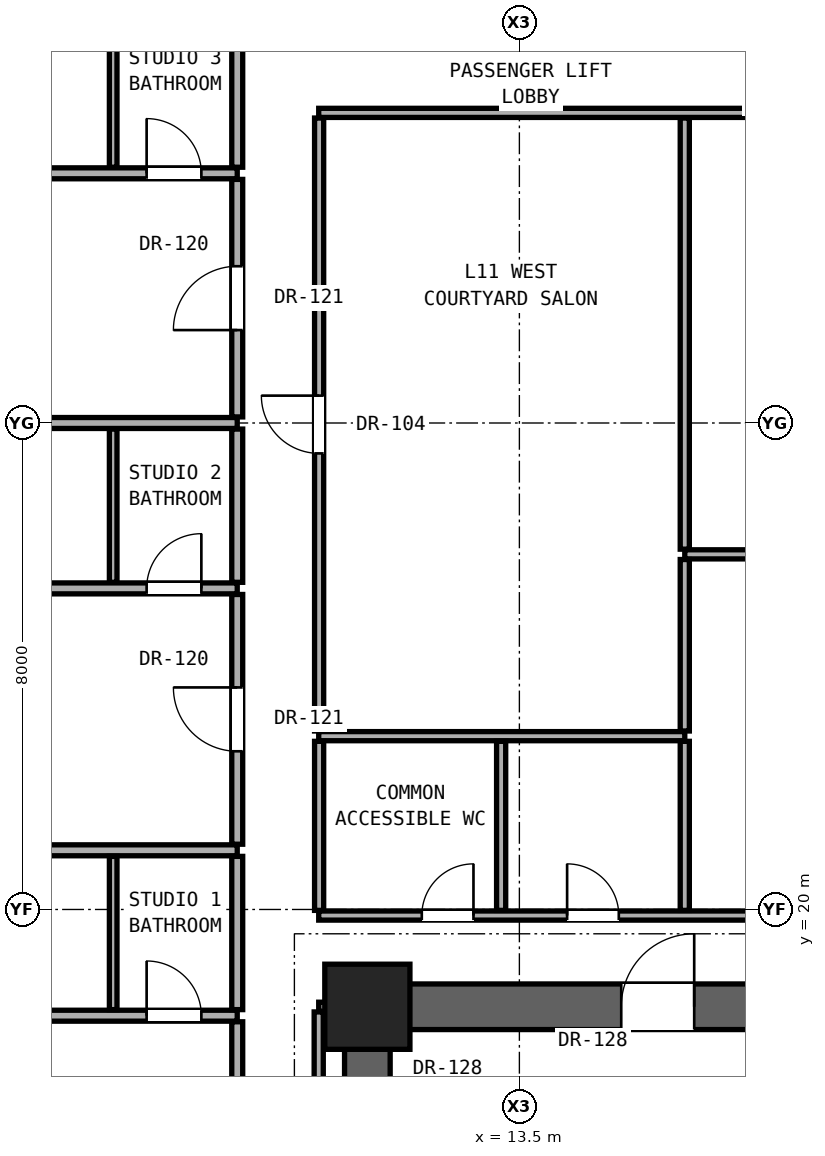
"""IFC4 building model, lengths in metres.
Left out: names, types, materials, properties, quantities, classifications, styles, units other than length and angle.
Written with IfcOpenShell. Run it as: python <this file> out.ifc"""

import sys

from ifc_helpers import new_model, si_unit, direction, frame, frame_2d, origin, origin_2d, place, context, subcontext, project, spatial, rectangle, extrude, element, fill, save


model = new_model("IFC4")
c1 = context("Model", 3, precision=1e-05, world=origin(), true_north=direction((0.0, 1.0)))
c2 = subcontext(c1, "Body", "Model", "MODEL_VIEW")
j1 = project(units=[si_unit("LENGTHUNIT", "METRE"), si_unit("PLANEANGLEUNIT", "RADIAN")], contexts=[c1])
p1 = place(None, origin())
s1 = spatial("IfcSite", under=j1, at=p1, CompositionType="ELEMENT")
p2 = place(p1, origin())
s2 = spatial("IfcBuilding", under=s1, at=p2, CompositionType="ELEMENT")
p3 = place(p2, frame((0.0, 0.0, 42.2)))
s3 = spatial("IfcBuildingStorey", under=s2, at=p3, CompositionType="ELEMENT", Elevation=42.2)
p4 = place(p3, frame((11.0, 18.4, 0.0), z_axis=(0.0, 0.0, 1.0), x_axis=(1.0, 0.0, 0.0)))
e1 = element("IfcColumn", 1, at=p4, inside=s3, PredefinedType="COLUMN", context=c2, shape_type="SweptSolid", body=[
    extrude(rectangle(XDim=1.4, YDim=1.4, at=origin_2d()), origin(), (0.0, 0.0, 1.0), 3.3),
])
p5 = place(p3, frame((11.0, 12.4, 0.0), z_axis=(0.0, 0.0, 1.0), x_axis=(0.0, 1.0, 0.0)))
e2 = element("IfcWall", 2, at=p5, inside=s3, PredefinedType="SHEAR", context=c2, shape_type="SweptSolid", body=[
    extrude(rectangle(XDim=6.0, YDim=0.75, at=frame_2d((3.0, 0.0))), origin(), (0.0, 0.0, 1.0), 3.06),
])
p6 = place(p3, frame((11.0, 18.4, 0.0), z_axis=(0.0, 0.0, 1.0), x_axis=(1.0, 0.0, 0.0)))
e3 = element("IfcWall", 3, at=p6, inside=s3, PredefinedType="SHEAR", context=c2, shape_type="SweptSolid", body=[
    extrude(rectangle(XDim=19.0, YDim=0.75, at=frame_2d((9.5, 0.0))), origin(), (0.0, 0.0, 1.0), 3.06),
])
p7 = place(p6, frame((4.175, 0.0, 0.0)))
e4 = element("IfcOpeningElement", 4, at=p7, cuts=e3, PredefinedType="OPENING", context=c2, shape_type="SweptSolid", body=[
    extrude(rectangle(XDim=1.2, YDim=2.25, at=frame_2d((0.6, 1.125))), frame((0.0, 0.385, 0.0), z_axis=(0.0, -1.0, 0.0), x_axis=(1.0, 0.0, 0.0)), (0.0, 0.0, 1.0), 0.77),
])
p8 = place(p6, frame((9.6, 0.0, 0.0)))
e5 = element("IfcOpeningElement", 5, at=p8, cuts=e3, PredefinedType="OPENING", context=c2, shape_type="SweptSolid", body=[
    extrude(rectangle(XDim=1.3, YDim=2.3, at=frame_2d((0.65, 1.15))), frame((0.0, 0.385, 0.0), z_axis=(0.0, -1.0, 0.0), x_axis=(1.0, 0.0, 0.0)), (0.0, 0.0, 1.0), 0.77),
])
p9 = place(p6, frame((11.9, 0.0, 0.0)))
e6 = element("IfcOpeningElement", 6, at=p9, cuts=e3, PredefinedType="OPENING", context=c2, shape_type="SweptSolid", body=[
    extrude(rectangle(XDim=1.3, YDim=2.3, at=frame_2d((0.65, 1.15))), frame((0.0, 0.385, 0.0), z_axis=(0.0, -1.0, 0.0), x_axis=(1.0, 0.0, 0.0)), (0.0, 0.0, 1.0), 0.77),
])
p10 = place(p6, frame((14.3, 0.0, 0.0)))
e7 = element("IfcOpeningElement", 7, at=p10, cuts=e3, PredefinedType="OPENING", context=c2, shape_type="SweptSolid", body=[
    extrude(rectangle(XDim=1.3, YDim=2.3, at=frame_2d((0.65, 1.15))), frame((0.0, 0.385, 0.0), z_axis=(0.0, -1.0, 0.0), x_axis=(1.0, 0.0, 0.0)), (0.0, 0.0, 1.0), 0.77),
])
p11 = place(p6, frame((16.6, 0.0, 0.0)))
e8 = element("IfcOpeningElement", 8, at=p11, cuts=e3, PredefinedType="OPENING", context=c2, shape_type="SweptSolid", body=[
    extrude(rectangle(XDim=1.3, YDim=2.3, at=frame_2d((0.65, 1.15))), frame((0.0, 0.385, 0.0), z_axis=(0.0, -1.0, 0.0), x_axis=(1.0, 0.0, 0.0)), (0.0, 0.0, 1.0), 0.77),
])
p12 = place(p3, frame((-2.16, 18.253, 0.0), z_axis=(0.0, 0.0, 1.0), x_axis=(1.0, 0.0, 0.0)))
e9 = element("IfcWall", 9, at=p12, inside=s3, PredefinedType="PARTITIONING", context=c2, shape_type="SweptSolid", body=[
    extrude(rectangle(XDim=11.02, YDim=0.18, at=frame_2d((5.51, 0.0))), origin(), (0.0, 0.0, 1.0), 2.436),
])
p13 = place(p12, frame((5.385, 0.0, 0.0)))
e10 = element("IfcOpeningElement", 10, at=p13, cuts=e9, PredefinedType="OPENING", context=c2, shape_type="SweptSolid", body=[
    extrude(rectangle(XDim=0.95, YDim=2.15, at=frame_2d((0.475, 1.075))), frame((0.0, 0.1, 0.0), z_axis=(0.0, -1.0, 0.0), x_axis=(1.0, 0.0, 0.0)), (0.0, 0.0, 1.0), 0.2),
])
p14 = place(p12, frame((9.53, 0.0, 0.0)))
e11 = element("IfcOpeningElement", 11, at=p14, cuts=e9, PredefinedType="OPENING", context=c2, shape_type="SweptSolid", body=[
    extrude(rectangle(XDim=0.9, YDim=2.1, at=frame_2d((0.45, 1.05))), frame((0.0, 0.1, 0.0), z_axis=(0.0, -1.0, 0.0), x_axis=(1.0, 0.0, 0.0)), (0.0, 0.0, 1.0), 0.2),
])
p15 = place(p3, frame((10.2, 18.4, 0.0), z_axis=(0.0, 0.0, 1.0), x_axis=(1.0, 0.0, 0.0)))
e12 = element("IfcWall", 12, at=p15, inside=s3, PredefinedType="PARTITIONING", context=c2, shape_type="SweptSolid", body=[
    extrude(rectangle(XDim=0.43, YDim=0.15, at=frame_2d((0.215, 0.0))), origin(), (0.0, 0.0, 1.0), 2.436),
])
p16 = place(p3, frame((10.2, 19.9, 0.0), z_axis=(0.0, 0.0, 1.0), x_axis=(1.0, 0.0, 0.0)))
e13 = element("IfcWall", 13, at=p16, inside=s3, PredefinedType="PARTITIONING", context=c2, shape_type="SweptSolid", body=[
    extrude(rectangle(XDim=20.6, YDim=0.15, at=frame_2d((10.3, 0.0))), origin(), (0.0, 0.0, 1.0), 2.104),
])
p17 = place(p16, frame((1.695, 0.0, 0.0)))
e14 = element("IfcOpeningElement", 14, at=p17, cuts=e13, PredefinedType="OPENING", context=c2, shape_type="SweptSolid", body=[
    extrude(rectangle(XDim=0.85, YDim=2.01, at=frame_2d((0.425, 1.005))), frame((0.0, 0.085, 0.0), z_axis=(0.0, -1.0, 0.0), x_axis=(1.0, 0.0, 0.0)), (0.0, 0.0, 1.0), 0.17),
])
p18 = place(p16, frame((4.085, 0.0, 0.0)))
e15 = element("IfcOpeningElement", 15, at=p18, cuts=e13, PredefinedType="OPENING", context=c2, shape_type="SweptSolid", body=[
    extrude(rectangle(XDim=0.85, YDim=2.01, at=frame_2d((0.425, 1.005))), frame((0.0, 0.085, 0.0), z_axis=(0.0, -1.0, 0.0), x_axis=(1.0, 0.0, 0.0)), (0.0, 0.0, 1.0), 0.17),
])
p19 = place(p16, frame((9.677, 0.0, 0.0)))
e16 = element("IfcOpeningElement", 16, at=p19, cuts=e13, PredefinedType="OPENING", context=c2, shape_type="SweptSolid", body=[
    extrude(rectangle(XDim=0.85, YDim=2.01, at=frame_2d((0.425, 1.005))), frame((0.0, 0.085, 0.0), z_axis=(0.0, -1.0, 0.0), x_axis=(1.0, 0.0, 0.0)), (0.0, 0.0, 1.0), 0.17),
])
p20 = place(p16, frame((16.948, 0.0, 0.0)))
e17 = element("IfcOpeningElement", 17, at=p20, cuts=e13, PredefinedType="OPENING", context=c2, shape_type="SweptSolid", body=[
    extrude(rectangle(XDim=0.85, YDim=2.01, at=frame_2d((0.425, 1.005))), frame((0.0, 0.085, 0.0), z_axis=(0.0, -1.0, 0.0), x_axis=(1.0, 0.0, 0.0)), (0.0, 0.0, 1.0), 0.17),
])
p21 = place(p3, frame((-2.16, 20.973, 0.0), z_axis=(0.0, 0.0, 1.0), x_axis=(1.0, 0.0, 0.0)))
e18 = element("IfcWall", 18, at=p21, inside=s3, PredefinedType="PARTITIONING", context=c2, shape_type="SweptSolid", body=[
    extrude(rectangle(XDim=11.02, YDim=0.18, at=frame_2d((5.51, 0.0))), origin(), (0.0, 0.0, 1.0), 2.125),
])
p22 = place(p3, frame((10.2, 22.85, 0.0), z_axis=(0.0, 0.0, 1.0), x_axis=(1.0, 0.0, 0.0)))
e19 = element("IfcWall", 19, at=p22, inside=s3, PredefinedType="PARTITIONING", context=c2, shape_type="SweptSolid", body=[
    extrude(rectangle(XDim=6.02, YDim=0.15, at=frame_2d((3.01, 0.0))), origin(), (0.0, 0.0, 1.0), 2.104),
])
p23 = place(p3, frame((-2.16, 25.28, 0.0), z_axis=(0.0, 0.0, 1.0), x_axis=(1.0, 0.0, 0.0)))
e20 = element("IfcWall", 20, at=p23, inside=s3, PredefinedType="PARTITIONING", context=c2, shape_type="SweptSolid", body=[
    extrude(rectangle(XDim=11.02, YDim=0.18, at=frame_2d((5.51, 0.0))), origin(), (0.0, 0.0, 1.0), 2.125),
])
p24 = place(p23, frame((5.035, 0.0, 0.0)))
e21 = element("IfcOpeningElement", 21, at=p24, cuts=e20, PredefinedType="OPENING", context=c2, shape_type="SweptSolid", body=[
    extrude(rectangle(XDim=0.85, YDim=2.01, at=frame_2d((0.425, 1.005))), frame((0.0, 0.1, 0.0), z_axis=(0.0, -1.0, 0.0), x_axis=(1.0, 0.0, 0.0)), (0.0, 0.0, 1.0), 0.2),
])
p25 = place(p23, frame((9.53, 0.0, 0.0)))
e22 = element("IfcOpeningElement", 22, at=p25, cuts=e20, PredefinedType="OPENING", context=c2, shape_type="SweptSolid", body=[
    extrude(rectangle(XDim=0.9, YDim=2.1, at=frame_2d((0.45, 1.05))), frame((0.0, 0.1, 0.0), z_axis=(0.0, -1.0, 0.0), x_axis=(1.0, 0.0, 0.0)), (0.0, 0.0, 1.0), 0.2),
])
p26 = place(p3, frame((16.22, 25.84, 0.0), z_axis=(0.0, 0.0, 1.0), x_axis=(1.0, 0.0, 0.0)))
e23 = element("IfcWall", 23, at=p26, inside=s3, PredefinedType="PARTITIONING", context=c2, shape_type="SweptSolid", body=[
    extrude(rectangle(XDim=14.58, YDim=0.15, at=frame_2d((7.29, 0.0))), origin(), (0.0, 0.0, 1.0), 2.104),
])
p27 = place(p3, frame((-2.16, 28.0, 0.0), z_axis=(0.0, 0.0, 1.0), x_axis=(1.0, 0.0, 0.0)))
e24 = element("IfcWall", 24, at=p27, inside=s3, PredefinedType="PARTITIONING", context=c2, shape_type="SweptSolid", body=[
    extrude(rectangle(XDim=11.02, YDim=0.18, at=frame_2d((5.51, 0.0))), origin(), (0.0, 0.0, 1.0), 2.125),
])
p28 = place(p3, frame((-2.16, 32.106, 0.0), z_axis=(0.0, 0.0, 1.0), x_axis=(1.0, 0.0, 0.0)))
e25 = element("IfcWall", 25, at=p28, inside=s3, PredefinedType="PARTITIONING", context=c2, shape_type="SweptSolid", body=[
    extrude(rectangle(XDim=11.02, YDim=0.18, at=frame_2d((5.51, 0.0))), origin(), (0.0, 0.0, 1.0), 2.125),
])
p29 = place(p28, frame((5.035, 0.0, 0.0)))
e26 = element("IfcOpeningElement", 26, at=p29, cuts=e25, PredefinedType="OPENING", context=c2, shape_type="SweptSolid", body=[
    extrude(rectangle(XDim=0.85, YDim=2.01, at=frame_2d((0.425, 1.005))), frame((0.0, 0.1, 0.0), z_axis=(0.0, -1.0, 0.0), x_axis=(1.0, 0.0, 0.0)), (0.0, 0.0, 1.0), 0.2),
])
p30 = place(p28, frame((9.53, 0.0, 0.0)))
e27 = element("IfcOpeningElement", 27, at=p30, cuts=e25, PredefinedType="OPENING", context=c2, shape_type="SweptSolid", body=[
    extrude(rectangle(XDim=0.9, YDim=2.1, at=frame_2d((0.45, 1.05))), frame((0.0, 0.1, 0.0), z_axis=(0.0, -1.0, 0.0), x_axis=(1.0, 0.0, 0.0)), (0.0, 0.0, 1.0), 0.2),
])
p31 = place(p3, frame((10.2, 33.1, 0.0), z_axis=(0.0, 0.0, 1.0), x_axis=(1.0, 0.0, 0.0)))
e28 = element("IfcWall", 28, at=p31, inside=s3, PredefinedType="PARTITIONING", context=c2, shape_type="SweptSolid", body=[
    extrude(rectangle(XDim=20.6, YDim=0.15, at=frame_2d((10.3, 0.0))), origin(), (0.0, 0.0, 1.0), 2.104),
])
p32 = place(p31, frame((9.677, 0.0, 0.0)))
e29 = element("IfcOpeningElement", 29, at=p32, cuts=e28, PredefinedType="OPENING", context=c2, shape_type="SweptSolid", body=[
    extrude(rectangle(XDim=0.85, YDim=2.01, at=frame_2d((0.425, 1.005))), frame((0.0, 0.085, 0.0), z_axis=(0.0, -1.0, 0.0), x_axis=(1.0, 0.0, 0.0)), (0.0, 0.0, 1.0), 0.17),
])
p33 = place(p31, frame((16.948, 0.0, 0.0)))
e30 = element("IfcOpeningElement", 30, at=p33, cuts=e28, PredefinedType="OPENING", context=c2, shape_type="SweptSolid", body=[
    extrude(rectangle(XDim=0.85, YDim=2.01, at=frame_2d((0.425, 1.005))), frame((0.0, 0.085, 0.0), z_axis=(0.0, -1.0, 0.0), x_axis=(1.0, 0.0, 0.0)), (0.0, 0.0, 1.0), 0.17),
])
p34 = place(p3, frame((6.82, 18.353, 0.0), z_axis=(0.0, 0.0, 1.0), x_axis=(0.0, 1.0, 0.0)))
e31 = element("IfcWall", 31, at=p34, inside=s3, PredefinedType="PARTITIONING", context=c2, shape_type="SweptSolid", body=[
    extrude(rectangle(XDim=2.52, YDim=0.125, at=frame_2d((1.26, 0.0))), origin(), (0.0, 0.0, 1.0), 2.452),
])
p35 = place(p3, frame((6.82, 25.38, 0.0), z_axis=(0.0, 0.0, 1.0), x_axis=(0.0, 1.0, 0.0)))
e32 = element("IfcWall", 32, at=p35, inside=s3, PredefinedType="PARTITIONING", context=c2, shape_type="SweptSolid", body=[
    extrude(rectangle(XDim=2.52, YDim=0.125, at=frame_2d((1.26, 0.0))), origin(), (0.0, 0.0, 1.0), 3.06),
])
p36 = place(p3, frame((6.82, 32.206, 0.0), z_axis=(0.0, 0.0, 1.0), x_axis=(0.0, 1.0, 0.0)))
e33 = element("IfcWall", 33, at=p36, inside=s3, PredefinedType="PARTITIONING", context=c2, shape_type="SweptSolid", body=[
    extrude(rectangle(XDim=2.547, YDim=0.125, at=frame_2d((1.274, 0.0))), origin(), (0.0, 0.0, 1.0), 3.06),
])
p37 = place(p3, frame((8.86, 13.912, 0.0), z_axis=(0.0, 0.0, 1.0), x_axis=(0.0, 1.0, 0.0)))
e34 = element("IfcWall", 34, at=p37, inside=s3, PredefinedType="PARTITIONING", context=c2, shape_type="SweptSolid", body=[
    extrude(rectangle(XDim=4.241, YDim=0.18, at=frame_2d((2.121, 0.0))), origin(), (0.0, 0.0, 1.0), 2.436),
])
p38 = place(p37, frame((0.246, 0.0, 0.0)))
e35 = element("IfcOpeningElement", 35, at=p38, cuts=e34, PredefinedType="OPENING", context=c2, shape_type="SweptSolid", body=[
    extrude(rectangle(XDim=1.05, YDim=2.2, at=frame_2d((0.525, 1.1))), frame((0.0, 0.1, 0.0), z_axis=(0.0, -1.0, 0.0), x_axis=(1.0, 0.0, 0.0)), (0.0, 0.0, 1.0), 0.2),
])
p39 = place(p3, frame((8.86, 18.353, 0.0), z_axis=(0.0, 0.0, 1.0), x_axis=(0.0, 1.0, 0.0)))
e36 = element("IfcWall", 36, at=p39, inside=s3, PredefinedType="PARTITIONING", context=c2, shape_type="SweptSolid", body=[
    extrude(rectangle(XDim=2.52, YDim=0.18, at=frame_2d((1.26, 0.0))), origin(), (0.0, 0.0, 1.0), 2.452),
])
p40 = place(p3, frame((8.86, 21.073, 0.0), z_axis=(0.0, 0.0, 1.0), x_axis=(0.0, 1.0, 0.0)))
e37 = element("IfcWall", 37, at=p40, inside=s3, PredefinedType="PARTITIONING", context=c2, shape_type="SweptSolid", body=[
    extrude(rectangle(XDim=4.107, YDim=0.18, at=frame_2d((2.053, 0.0))), origin(), (0.0, 0.0, 1.0), 2.279),
])
p41 = place(p40, frame((1.529, 0.0, 0.0)))
e38 = element("IfcOpeningElement", 38, at=p41, cuts=e37, PredefinedType="OPENING", context=c2, shape_type="SweptSolid", body=[
    extrude(rectangle(XDim=1.05, YDim=2.2, at=frame_2d((0.525, 1.1))), frame((0.0, 0.1, 0.0), z_axis=(0.0, -1.0, 0.0), x_axis=(1.0, 0.0, 0.0)), (0.0, 0.0, 1.0), 0.2),
])
p42 = place(p3, frame((8.86, 25.38, 0.0), z_axis=(0.0, 0.0, 1.0), x_axis=(0.0, 1.0, 0.0)))
e39 = element("IfcWall", 39, at=p42, inside=s3, PredefinedType="PARTITIONING", context=c2, shape_type="SweptSolid", body=[
    extrude(rectangle(XDim=2.52, YDim=0.18, at=frame_2d((1.26, 0.0))), origin(), (0.0, 0.0, 1.0), 3.06),
])
p43 = place(p3, frame((8.86, 28.1, 0.0), z_axis=(0.0, 0.0, 1.0), x_axis=(0.0, 1.0, 0.0)))
e40 = element("IfcWall", 40, at=p43, inside=s3, PredefinedType="PARTITIONING", context=c2, shape_type="SweptSolid", body=[
    extrude(rectangle(XDim=3.906, YDim=0.18, at=frame_2d((1.953, 0.0))), origin(), (0.0, 0.0, 1.0), 2.279),
])
p44 = place(p43, frame((1.428, 0.0, 0.0)))
e41 = element("IfcOpeningElement", 41, at=p44, cuts=e40, PredefinedType="OPENING", context=c2, shape_type="SweptSolid", body=[
    extrude(rectangle(XDim=1.05, YDim=2.2, at=frame_2d((0.525, 1.1))), frame((0.0, 0.1, 0.0), z_axis=(0.0, -1.0, 0.0), x_axis=(1.0, 0.0, 0.0)), (0.0, 0.0, 1.0), 0.2),
])
p45 = place(p3, frame((8.86, 32.206, 0.0), z_axis=(0.0, 0.0, 1.0), x_axis=(0.0, 1.0, 0.0)))
e42 = element("IfcWall", 42, at=p45, inside=s3, PredefinedType="PARTITIONING", context=c2, shape_type="SweptSolid", body=[
    extrude(rectangle(XDim=2.547, YDim=0.18, at=frame_2d((1.274, 0.0))), origin(), (0.0, 0.0, 1.0), 3.06),
])
p46 = place(p3, frame((10.2, 12.335, 0.0), z_axis=(0.0, 0.0, 1.0), x_axis=(0.0, 1.0, 0.0)))
e43 = element("IfcWall", 43, at=p46, inside=s3, PredefinedType="PARTITIONING", context=c2, shape_type="SweptSolid", body=[
    extrude(rectangle(XDim=5.98, YDim=0.15, at=frame_2d((2.99, 0.0))), origin(), (0.0, 0.0, 1.0), 2.436),
])
p47 = place(p3, frame((10.207, 19.985, 0.0), z_axis=(0.0, 0.0, 1.0), x_axis=(0.0, 1.0, 0.0)))
e44 = element("IfcWall", 44, at=p47, inside=s3, PredefinedType="PARTITIONING", context=c2, shape_type="SweptSolid", body=[
    extrude(rectangle(XDim=2.78, YDim=0.15, at=frame_2d((1.39, 0.0))), origin(), (0.0, 0.0, 1.0), 3.06),
])
p48 = place(p3, frame((10.207, 22.935, 0.0), z_axis=(0.0, 0.0, 1.0), x_axis=(0.0, 1.0, 0.0)))
e45 = element("IfcWall", 45, at=p48, inside=s3, PredefinedType="PARTITIONING", context=c2, shape_type="SweptSolid", body=[
    extrude(rectangle(XDim=10.08, YDim=0.15, at=frame_2d((5.04, 0.0))), origin(), (0.0, 0.0, 1.0), 2.279),
])
p49 = place(p48, frame((4.565, 0.0, 0.0)))
e46 = element("IfcOpeningElement", 46, at=p49, cuts=e45, PredefinedType="OPENING", context=c2, shape_type="SweptSolid", body=[
    extrude(rectangle(XDim=0.95, YDim=2.15, at=frame_2d((0.475, 1.075))), frame((0.0, 0.085, 0.0), z_axis=(0.0, -1.0, 0.0), x_axis=(1.0, 0.0, 0.0)), (0.0, 0.0, 1.0), 0.17),
])
for number, where, z_axis, x_axis in (
    (47, (13.2, 19.985, 0.0), (0.0, 0.0, 1.0), (0.0, 1.0, 0.0)),
    (48, (16.22, 19.985, 0.0), (0.0, 0.0, 1.0), (0.0, 1.0, 0.0)),
):
    element("IfcWall", number, at=place(p3, frame(where, z_axis=z_axis, x_axis=x_axis)), inside=s3, PredefinedType="PARTITIONING", context=c2, shape_type="SweptSolid", body=[
        extrude(rectangle(XDim=2.78, YDim=0.15, at=frame_2d((1.39, 0.0))), origin(), (0.0, 0.0, 1.0), 3.06),
    ])
p50 = place(p3, frame((16.22, 22.935, 0.0), z_axis=(0.0, 0.0, 1.0), x_axis=(0.0, 1.0, 0.0)))
e49 = element("IfcWall", 49, at=p50, inside=s3, PredefinedType="PARTITIONING", context=c2, shape_type="SweptSolid", body=[
    extrude(rectangle(XDim=2.82, YDim=0.15, at=frame_2d((1.41, 0.0))), origin(), (0.0, 0.0, 1.0), 2.104),
])
p51 = place(p3, frame((16.22, 25.925, 0.0), z_axis=(0.0, 0.0, 1.0), x_axis=(0.0, 1.0, 0.0)))
e50 = element("IfcWall", 50, at=p51, inside=s3, PredefinedType="PARTITIONING", context=c2, shape_type="SweptSolid", body=[
    extrude(rectangle(XDim=7.09, YDim=0.15, at=frame_2d((3.545, 0.0))), origin(), (0.0, 0.0, 1.0), 2.104),
])
p52 = place(p7, origin())
e51 = element("IfcDoor", 51, at=p52, inside=s3, OperationType="SINGLE_SWING_RIGHT", PredefinedType="DOOR", context=c2, shape_type="SweptSolid", body=[
    extrude(rectangle(XDim=1.2, YDim=2.25, at=frame_2d((0.6, 1.125))), frame((0.0, 0.025, 0.0), z_axis=(0.0, -1.0, 0.0), x_axis=(1.0, 0.0, 0.0)), (0.0, 0.0, 1.0), 0.05),
])
fill(e4, e51)
p53 = place(p17, origin())
e52 = element("IfcDoor", 52, at=p53, inside=s3, OperationType="SINGLE_SWING_RIGHT", PredefinedType="DOOR", context=c2, shape_type="SweptSolid", body=[
    extrude(rectangle(XDim=0.85, YDim=2.01, at=frame_2d((0.425, 1.005))), frame((0.0, 0.025, 0.0), z_axis=(0.0, -1.0, 0.0), x_axis=(1.0, 0.0, 0.0)), (0.0, 0.0, 1.0), 0.05),
])
fill(e14, e52)
p54 = place(p14, origin())
e53 = element("IfcDoor", 53, at=p54, inside=s3, OperationType="SINGLE_SWING_LEFT", PredefinedType="DOOR", context=c2, shape_type="SweptSolid", body=[
    extrude(rectangle(XDim=0.9, YDim=2.1, at=frame_2d((0.45, 1.05))), frame((0.0, 0.025, 0.0), z_axis=(0.0, -1.0, 0.0), x_axis=(1.0, 0.0, 0.0)), (0.0, 0.0, 1.0), 0.05),
])
fill(e11, e53)
p55 = place(p41, origin())
e54 = element("IfcDoor", 54, at=p55, inside=s3, OperationType="SINGLE_SWING_RIGHT", PredefinedType="DOOR", context=c2, shape_type="SweptSolid", body=[
    extrude(rectangle(XDim=1.05, YDim=2.2, at=frame_2d((0.525, 1.1))), frame((0.0, 0.025, 0.0), z_axis=(0.0, -1.0, 0.0), x_axis=(1.0, 0.0, 0.0)), (0.0, 0.0, 1.0), 0.05),
])
fill(e38, e54)
p56 = place(p25, origin())
e55 = element("IfcDoor", 55, at=p56, inside=s3, OperationType="SINGLE_SWING_RIGHT", PredefinedType="DOOR", context=c2, shape_type="SweptSolid", body=[
    extrude(rectangle(XDim=0.9, YDim=2.1, at=frame_2d((0.45, 1.05))), frame((0.0, 0.025, 0.0), z_axis=(0.0, -1.0, 0.0), x_axis=(1.0, 0.0, 0.0)), (0.0, 0.0, 1.0), 0.05),
])
fill(e22, e55)
p57 = place(p44, origin())
e56 = element("IfcDoor", 56, at=p57, inside=s3, OperationType="SINGLE_SWING_LEFT", PredefinedType="DOOR", context=c2, shape_type="SweptSolid", body=[
    extrude(rectangle(XDim=1.05, YDim=2.2, at=frame_2d((0.525, 1.1))), frame((0.0, 0.025, 0.0), z_axis=(0.0, -1.0, 0.0), x_axis=(1.0, 0.0, 0.0)), (0.0, 0.0, 1.0), 0.05),
])
fill(e41, e56)
p58 = place(p30, origin())
e57 = element("IfcDoor", 57, at=p58, inside=s3, OperationType="SINGLE_SWING_LEFT", PredefinedType="DOOR", context=c2, shape_type="SweptSolid", body=[
    extrude(rectangle(XDim=0.9, YDim=2.1, at=frame_2d((0.45, 1.05))), frame((0.0, 0.025, 0.0), z_axis=(0.0, -1.0, 0.0), x_axis=(1.0, 0.0, 0.0)), (0.0, 0.0, 1.0), 0.05),
])
fill(e27, e57)
p59 = place(p18, origin())
e58 = element("IfcDoor", 58, at=p59, inside=s3, OperationType="SINGLE_SWING_LEFT", PredefinedType="DOOR", context=c2, shape_type="SweptSolid", body=[
    extrude(rectangle(XDim=0.85, YDim=2.01, at=frame_2d((0.425, 1.005))), frame((0.0, 0.025, 0.0), z_axis=(0.0, -1.0, 0.0), x_axis=(1.0, 0.0, 0.0)), (0.0, 0.0, 1.0), 0.05),
])
fill(e15, e58)
p60 = place(p49, origin())
e59 = element("IfcDoor", 59, at=p60, inside=s3, OperationType="SINGLE_SWING_RIGHT", PredefinedType="DOOR", context=c2, shape_type="SweptSolid", body=[
    extrude(rectangle(XDim=0.95, YDim=2.15, at=frame_2d((0.475, 1.075))), frame((0.0, 0.025, 0.0), z_axis=(0.0, -1.0, 0.0), x_axis=(1.0, 0.0, 0.0)), (0.0, 0.0, 1.0), 0.05),
])
fill(e46, e59)
save(model, sys.argv[1])
